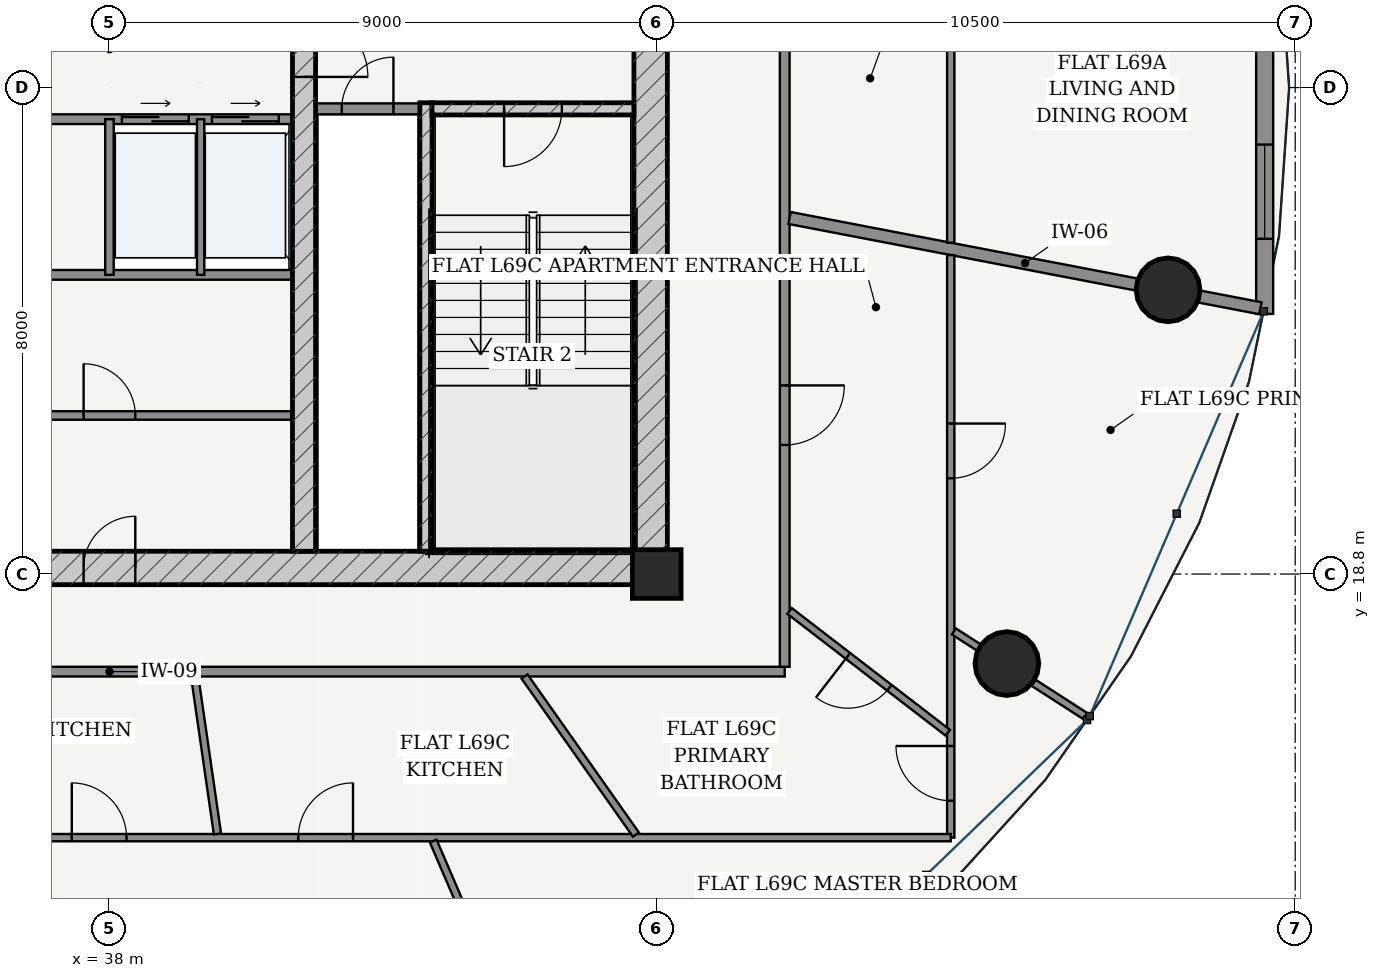
"""IFC4 building model, lengths in metres.
Left out: names, types, materials, properties, quantities, classifications, styles, units other than length and angle.
Written with IfcOpenShell. Run it as: python <this file> out.ifc"""

import sys

from ifc_helpers import new_model, si_unit, direction, frame, frame_2d, origin, origin_2d, place, context, subcontext, project, spatial, rectangle, hollow_circle, extrude, source, transform, mapped, element, fill, save


model = new_model("IFC4")
c1 = context("Model", 3, precision=1e-05, world=origin(), true_north=direction((-0.2419218956, 0.970295726276)))
c2 = subcontext(c1, "Body", "Model", "MODEL_VIEW")
j1 = project(units=[si_unit("LENGTHUNIT", "METRE"), si_unit("PLANEANGLEUNIT", "RADIAN")], contexts=[c1])
p1 = place(None, origin())
s1 = spatial("IfcSite", under=j1, at=p1, CompositionType="ELEMENT")
p2 = place(p1, origin())
s2 = spatial("IfcBuilding", under=s1, at=p2, CompositionType="ELEMENT")
p3 = place(p2, frame((0.0, 0.0, 263.2)))
s3 = spatial("IfcBuildingStorey", under=s2, at=p3, CompositionType="ELEMENT", Elevation=263.2)
p4 = place(p3, frame((47.0, 18.8, 0.0), z_axis=(0.0, 0.0, 1.0), x_axis=(1.0, 0.0, 0.0)))
e1 = element("IfcColumn", 1, at=p4, inside=s3, PredefinedType="COLUMN", context=c2, shape_type="SweptSolid", body=[
    extrude(rectangle(XDim=0.8, YDim=0.8, at=origin_2d()), origin(), (0.0, 0.0, 1.0), 3.75),
])
p5 = place(p3, frame((28.825, 18.9, 0.0), z_axis=(0.0, 0.0, 1.0), x_axis=(1.0, 0.0, 0.0)))
e2 = element("IfcWall", 2, at=p5, inside=s3, PredefinedType="SHEAR", context=c2, shape_type="SweptSolid", body=[
    extrude(rectangle(XDim=18.35, YDim=0.55, at=frame_2d((9.175, 0.0))), origin(), (0.0, 0.0, 1.0), 3.49),
])
p6 = place(p5, frame((8.75, 0.0, 0.0)))
e3 = element("IfcOpeningElement", 3, at=p6, cuts=e2, PredefinedType="OPENING", context=c2, shape_type="SweptSolid", body=[
    extrude(rectangle(XDim=0.85, YDim=2.1, at=frame_2d((0.425, 1.05))), frame((0.0, 0.285, 0.0), z_axis=(0.0, -1.0, 0.0), x_axis=(1.0, 0.0, 0.0)), (0.0, 0.0, 1.0), 0.57),
])
p7 = place(p3, frame((46.9, 19.175, 0.0), z_axis=(0.0, 0.0, 1.0), x_axis=(0.0, 1.0, 0.0)))
e4 = element("IfcWall", 4, at=p7, inside=s3, PredefinedType="SHEAR", context=c2, shape_type="SweptSolid", body=[
    extrude(rectangle(XDim=15.25, YDim=0.55, at=frame_2d((7.625, 0.0))), origin(), (0.0, 0.0, 1.0), 3.49),
])
p8 = place(p7, frame((9.875, 0.0, 0.0)))
e5 = element("IfcOpeningElement", 5, at=p8, cuts=e4, PredefinedType="OPENING", context=c2, shape_type="SweptSolid", body=[
    extrude(rectangle(XDim=1.5, YDim=2.2, at=frame_2d((0.75, 1.1))), frame((0.0, 0.285, 0.0), z_axis=(0.0, -1.0, 0.0), x_axis=(1.0, 0.0, 0.0)), (0.0, 0.0, 1.0), 0.57),
])
p9 = place(p3, frame((43.205, 19.175, 0.0), z_axis=(0.0, 0.0, 1.0), x_axis=(0.0, 1.0, 0.0)))
e6 = element("IfcWall", 6, at=p9, inside=s3, PredefinedType="SOLIDWALL", context=c2, shape_type="SweptSolid", body=[
    extrude(rectangle(XDim=7.375, YDim=0.2, at=frame_2d((3.688, 0.0))), origin(), (0.0, 0.0, 1.0), 3.49),
])
p10 = place(p3, frame((43.305, 26.45, 0.0), z_axis=(0.0, 0.0, 1.0), x_axis=(1.0, 0.0, 0.0)))
e7 = element("IfcWall", 7, at=p10, inside=s3, PredefinedType="SOLIDWALL", context=c2, shape_type="SweptSolid", body=[
    extrude(rectangle(XDim=3.32, YDim=0.2, at=frame_2d((1.66, 0.0))), origin(), (0.0, 0.0, 1.0), 3.49),
])
p11 = place(p10, frame((1.185, 0.0, 0.0)))
e8 = element("IfcOpeningElement", 8, at=p11, cuts=e7, PredefinedType="OPENING", context=c2, shape_type="SweptSolid", body=[
    extrude(rectangle(XDim=0.95, YDim=2.15, at=frame_2d((0.475, 1.075))), frame((0.0, 0.11, 0.0), z_axis=(0.0, -1.0, 0.0), x_axis=(1.0, 0.0, 0.0)), (0.0, 0.0, 1.0), 0.22),
])
p12 = place(p3, frame((41.2, 19.175, 0.0), z_axis=(0.0, 0.0, 1.0), x_axis=(0.0, 1.0, 0.0)))
e9 = element("IfcWall", 9, at=p12, inside=s3, PredefinedType="SHEAR", context=c2, shape_type="SweptSolid", body=[
    extrude(rectangle(XDim=15.25, YDim=0.38, at=frame_2d((7.625, 0.0))), origin(), (0.0, 0.0, 1.0), 3.49),
])
p13 = place(p12, frame((7.8, 0.0, 0.0)))
e10 = element("IfcOpeningElement", 10, at=p13, cuts=e9, PredefinedType="OPENING", context=c2, shape_type="SweptSolid", body=[
    extrude(rectangle(XDim=1.05, YDim=2.15, at=frame_2d((0.525, 1.075))), frame((0.0, 0.2, 0.0), z_axis=(0.0, -1.0, 0.0), x_axis=(1.0, 0.0, 0.0)), (0.0, 0.0, 1.0), 0.4),
])
for number, where, z_axis, x_axis in (
    (11, (52.759, 17.328, 0.0), (0.0, 0.0, 1.0), (1.0, 0.0, 0.0)),
    (12, (55.409, 23.474, 0.0), (0.0, 0.0, 1.0), (1.0, 0.0, 0.0)),
):
    element("IfcColumn", number, at=place(p3, frame(where, z_axis=z_axis, x_axis=x_axis)), inside=s3, PredefinedType="COLUMN", context=c2, shape_type="SweptSolid", body=[
        extrude(hollow_circle(Radius=0.525, WallThickness=0.035, at=origin_2d()), origin(), (0.0, 0.0, 1.0), 3.75),
    ])
p14 = place(p3, frame((56.998, 23.078, 0.0), z_axis=(0.0, 0.0, 1.0), x_axis=(0.0, 1.0, 0.0)))
e13 = element("IfcWall", 13, at=p14, inside=s3, PredefinedType="SOLIDWALL", context=c2, shape_type="SweptSolid", body=[
    extrude(rectangle(XDim=7.445, YDim=0.28, at=frame_2d((3.722, 0.0))), origin(), (0.0, 0.0, 1.0), 3.49),
])
p15 = place(p14, frame((1.235, 0.0, 0.85)))
e14 = element("IfcOpeningElement", 14, at=p15, cuts=e13, PredefinedType="OPENING", context=c2, shape_type="SweptSolid", body=[
    extrude(rectangle(XDim=1.55, YDim=1.95, at=frame_2d((0.775, 0.975))), frame((0.0, 0.15, 0.0), z_axis=(0.0, -1.0, 0.0), x_axis=(1.0, 0.0, 0.0)), (0.0, 0.0, 1.0), 0.3),
])
p16 = place(p14, frame((4.66, 0.0, 0.85)))
e15 = element("IfcOpeningElement", 15, at=p16, cuts=e13, PredefinedType="OPENING", context=c2, shape_type="SweptSolid", body=[
    extrude(rectangle(XDim=1.55, YDim=1.95, at=frame_2d((0.775, 0.975))), frame((0.0, 0.15, 0.0), z_axis=(0.0, -1.0, 0.0), x_axis=(1.0, 0.0, 0.0)), (0.0, 0.0, 1.0), 0.3),
])
p17 = place(p3, frame((41.39, 26.45, 0.0), z_axis=(0.0, 0.0, 1.0), x_axis=(1.0, 0.0, 0.0)))
e16 = element("IfcWall", 16, at=p17, inside=s3, PredefinedType="PARTITIONING", context=c2, shape_type="SweptSolid", body=[
    extrude(rectangle(XDim=1.71, YDim=0.18, at=frame_2d((0.855, 0.0))), origin(), (0.0, 0.0, 1.0), 3.49),
])
p18 = place(p17, frame((0.43, 0.0, 0.0)))
e17 = element("IfcOpeningElement", 17, at=p18, cuts=e16, PredefinedType="OPENING", context=c2, shape_type="SweptSolid", body=[
    extrude(rectangle(XDim=0.85, YDim=2.1, at=frame_2d((0.425, 1.05))), frame((0.0, 0.1, 0.0), z_axis=(0.0, -1.0, 0.0), x_axis=(1.0, 0.0, 0.0)), (0.0, 0.0, 1.0), 0.2),
])
p19 = place(p3, frame((34.99, 26.28, 0.0), z_axis=(0.0, 0.0, 1.0), x_axis=(1.0, 0.0, 0.0)))
e18 = element("IfcWall", 18, at=p19, inside=s3, PredefinedType="PARTITIONING", context=c2, shape_type="SweptSolid", body=[
    extrude(rectangle(XDim=6.02, YDim=0.16, at=frame_2d((3.01, 0.0))), origin(), (0.0, 0.0, 1.0), 3.49),
])
p20 = place(p19, frame((1.045, 0.0, 0.0)))
e19 = element("IfcOpeningElement", 19, at=p20, cuts=e18, PredefinedType="OPENING", context=c2, shape_type="SweptSolid", body=[
    extrude(rectangle(XDim=0.85, YDim=2.1, at=frame_2d((0.425, 1.05))), frame((0.0, 0.09, 0.0), z_axis=(0.0, -1.0, 0.0), x_axis=(1.0, 0.0, 0.0)), (0.0, 0.0, 1.0), 0.18),
])
p21 = place(p19, frame((3.215, 0.0, 0.0)))
e20 = element("IfcOpeningElement", 20, at=p21, cuts=e18, PredefinedType="OPENING", context=c2, shape_type="SweptSolid", body=[
    extrude(rectangle(XDim=1.1, YDim=2.2, at=frame_2d((0.55, 1.1))), frame((0.0, 0.09, 0.0), z_axis=(0.0, -1.0, 0.0), x_axis=(1.0, 0.0, 0.0)), (0.0, 0.0, 1.0), 0.18),
])
p22 = place(p19, frame((4.695, 0.0, 0.0)))
e21 = element("IfcOpeningElement", 21, at=p22, cuts=e18, PredefinedType="OPENING", context=c2, shape_type="SweptSolid", body=[
    extrude(rectangle(XDim=1.1, YDim=2.2, at=frame_2d((0.55, 1.1))), frame((0.0, 0.09, 0.0), z_axis=(0.0, -1.0, 0.0), x_axis=(1.0, 0.0, 0.0)), (0.0, 0.0, 1.0), 0.18),
])
p23 = place(p3, frame((34.99, 23.72, 0.0), z_axis=(0.0, 0.0, 1.0), x_axis=(1.0, 0.0, 0.0)))
e22 = element("IfcWall", 22, at=p23, inside=s3, PredefinedType="PARTITIONING", context=c2, shape_type="SweptSolid", body=[
    extrude(rectangle(XDim=6.02, YDim=0.16, at=frame_2d((3.01, 0.0))), origin(), (0.0, 0.0, 1.0), 3.49),
])
p24 = place(p3, frame((38.0, 23.72, 0.0), z_axis=(0.0, 0.0, 1.0), x_axis=(0.0, 1.0, 0.0)))
e23 = element("IfcWall", 23, at=p24, inside=s3, PredefinedType="PARTITIONING", context=c2, shape_type="SweptSolid", body=[
    extrude(rectangle(XDim=2.56, YDim=0.14, at=frame_2d((1.28, 0.0))), origin(), (0.0, 0.0, 1.0), 3.49),
])
p25 = place(p3, frame((39.5, 23.72, 0.0), z_axis=(0.0, 0.0, 1.0), x_axis=(0.0, 1.0, 0.0)))
e24 = element("IfcWall", 24, at=p25, inside=s3, PredefinedType="PARTITIONING", context=c2, shape_type="SweptSolid", body=[
    extrude(rectangle(XDim=2.56, YDim=0.12, at=frame_2d((1.28, 0.0))), origin(), (0.0, 0.0, 1.0), 3.49),
])
p26 = place(p3, frame((34.99, 21.407, 0.0), z_axis=(0.0, 0.0, 1.0), x_axis=(1.0, 0.0, 0.0)))
e25 = element("IfcWall", 25, at=p26, inside=s3, PredefinedType="PARTITIONING", context=c2, shape_type="SweptSolid", body=[
    extrude(rectangle(XDim=6.02, YDim=0.14, at=frame_2d((3.01, 0.0))), origin(), (0.0, 0.0, 1.0), 3.49),
])
p27 = place(p26, frame((2.585, 0.0, 0.0)))
e26 = element("IfcOpeningElement", 26, at=p27, cuts=e25, PredefinedType="OPENING", context=c2, shape_type="SweptSolid", body=[
    extrude(rectangle(XDim=0.85, YDim=2.1, at=frame_2d((0.425, 1.05))), frame((0.0, 0.08, 0.0), z_axis=(0.0, -1.0, 0.0), x_axis=(1.0, 0.0, 0.0)), (0.0, 0.0, 1.0), 0.16),
])
p28 = place(p3, frame((26.895, 17.195, 0.0), z_axis=(0.0, 0.0, 1.0), x_axis=(1.0, 0.0, 0.0)))
e27 = element("IfcWall", 27, at=p28, inside=s3, PredefinedType="PARTITIONING", context=c2, shape_type="SweptSolid", body=[
    extrude(rectangle(XDim=22.21, YDim=0.16, at=frame_2d((11.105, 0.0))), origin(), (0.0, 0.0, 1.0), 3.015),
])
p29 = place(p3, frame((49.105, 17.275, 0.0), z_axis=(0.0, 0.0, 1.0), x_axis=(0.0, 1.0, 0.0)))
e28 = element("IfcWall", 28, at=p29, inside=s3, PredefinedType="PARTITIONING", context=c2, shape_type="SweptSolid", body=[
    extrude(rectangle(XDim=13.925, YDim=0.16, at=frame_2d((6.962, 0.0))), origin(), (0.0, 0.0, 1.0), 3.015),
])
p30 = place(p29, frame((3.647, 0.0, 0.0)))
e29 = element("IfcOpeningElement", 29, at=p30, cuts=e28, PredefinedType="OPENING", context=c2, shape_type="SweptSolid", body=[
    extrude(rectangle(XDim=0.98, YDim=2.2, at=frame_2d((0.49, 1.1))), frame((0.0, 0.09, 0.0), z_axis=(0.0, -1.0, 0.0), x_axis=(1.0, 0.0, 0.0)), (0.0, 0.0, 1.0), 0.18),
])
p31 = place(p3, frame((49.185, 24.656, 0.0), z_axis=(0.0, 0.0, 1.0), x_axis=(0.982109889803, -0.188308694305, 0.0)))
e30 = element("IfcWall", 30, at=p31, inside=s3, PredefinedType="PARTITIONING", context=c2, shape_type="SweptSolid", body=[
    extrude(rectangle(XDim=7.884, YDim=0.2, at=frame_2d((3.942, 0.0))), origin(), (0.0, 0.0, 1.0), 3.015),
])
p32 = place(p3, frame((51.835, 34.01, 0.0), z_axis=(0.0, 0.0, 1.0), x_axis=(0.0, -1.0, 0.0)))
e31 = element("IfcWall", 31, at=p32, inside=s3, PredefinedType="PARTITIONING", context=c2, shape_type="SweptSolid", body=[
    extrude(rectangle(XDim=9.761, YDim=0.12, at=frame_2d((4.88, 0.0))), origin(), (0.0, 0.0, 1.0), 3.015),
])
p33 = place(p3, frame((51.835, 24.045, 0.0), z_axis=(0.0, 0.0, 1.0), x_axis=(0.0, -1.0, 0.0)))
e32 = element("IfcWall", 32, at=p33, inside=s3, PredefinedType="PARTITIONING", context=c2, shape_type="SweptSolid", body=[
    extrude(rectangle(XDim=9.58, YDim=0.12, at=frame_2d((4.79, 0.0))), origin(), (0.0, 0.0, 1.0), 3.015),
])
p34 = place(p33, frame((2.771, 0.0, 0.0)))
e33 = element("IfcOpeningElement", 33, at=p34, cuts=e32, PredefinedType="OPENING", context=c2, shape_type="SweptSolid", body=[
    extrude(rectangle(XDim=0.9, YDim=2.15, at=frame_2d((0.45, 1.075))), frame((0.0, 0.07, 0.0), z_axis=(0.0, -1.0, 0.0), x_axis=(1.0, 0.0, 0.0)), (0.0, 0.0, 1.0), 0.14),
])
p35 = place(p33, frame((8.073, 0.0, 0.0)))
e34 = element("IfcOpeningElement", 34, at=p35, cuts=e32, PredefinedType="OPENING", context=c2, shape_type="SweptSolid", body=[
    extrude(rectangle(XDim=0.9, YDim=2.15, at=frame_2d((0.45, 1.075))), frame((0.0, 0.07, 0.0), z_axis=(0.0, -1.0, 0.0), x_axis=(1.0, 0.0, 0.0)), (0.0, 0.0, 1.0), 0.14),
])
p36 = place(p3, frame((51.835, 14.465, 0.0), z_axis=(0.0, 0.0, 1.0), x_axis=(-1.0, 0.0, 0.0)))
e35 = element("IfcWall", 35, at=p36, inside=s3, PredefinedType="PARTITIONING", context=c2, shape_type="SweptSolid", body=[
    extrude(rectangle(XDim=16.278, YDim=0.12, at=frame_2d((8.139, 0.0))), origin(), (0.0, 0.0, 1.0), 3.015),
])
p37 = place(p36, frame((9.83, 0.0, 0.0)))
e36 = element("IfcOpeningElement", 36, at=p37, cuts=e35, PredefinedType="OPENING", context=c2, shape_type="SweptSolid", body=[
    extrude(rectangle(XDim=0.9, YDim=2.15, at=frame_2d((0.45, 1.075))), frame((0.0, 0.07, 0.0), z_axis=(0.0, -1.0, 0.0), x_axis=(1.0, 0.0, 0.0)), (0.0, 0.0, 1.0), 0.14),
])
p38 = place(p36, frame((13.554, 0.0, 0.0)))
e37 = element("IfcOpeningElement", 37, at=p38, cuts=e35, PredefinedType="OPENING", context=c2, shape_type="SweptSolid", body=[
    extrude(rectangle(XDim=0.9, YDim=2.15, at=frame_2d((0.45, 1.075))), frame((0.0, 0.07, 0.0), z_axis=(0.0, -1.0, 0.0), x_axis=(1.0, 0.0, 0.0)), (0.0, 0.0, 1.0), 0.14),
])
p39 = place(p3, frame((43.325, 14.408, 0.0), z_axis=(0.0, 0.0, 1.0), x_axis=(0.394816056217, -0.918760187292, 0.0)))
e38 = element("IfcWall", 38, at=p39, inside=s3, PredefinedType="PARTITIONING", context=c2, shape_type="SweptSolid", body=[
    extrude(rectangle(XDim=5.256, YDim=0.12, at=frame_2d((2.628, 0.0))), origin(), (0.0, 0.0, 1.0), 3.121),
])
p40 = place(p39, frame((2.178, 0.0, 0.0)))
e39 = element("IfcOpeningElement", 39, at=p40, cuts=e38, PredefinedType="OPENING", context=c2, shape_type="SweptSolid", body=[
    extrude(rectangle(XDim=0.9, YDim=2.15, at=frame_2d((0.45, 1.075))), frame((0.0, 0.07, 0.0), z_axis=(0.0, -1.0, 0.0), x_axis=(1.0, 0.0, 0.0)), (0.0, 0.0, 1.0), 0.14),
])
p41 = place(p3, frame((51.887, 17.856, 0.0), z_axis=(0.0, 0.0, 1.0), x_axis=(0.840708587197, -0.54148783127, 0.0)))
e40 = element("IfcWall", 40, at=p41, inside=s3, PredefinedType="PARTITIONING", context=c2, shape_type="SweptSolid", body=[
    extrude(rectangle(XDim=2.568, YDim=0.12, at=frame_2d((1.284, 0.0))), origin(), (0.0, 0.0, 1.0), 3.015),
])
p42 = place(p3, frame((39.402, 17.115, 0.0), z_axis=(0.0, 0.0, 1.0), x_axis=(0.143185278857, -0.989695900728, 0.0)))
e41 = element("IfcWall", 41, at=p42, inside=s3, PredefinedType="PARTITIONING", context=c2, shape_type="SweptSolid", body=[
    extrude(rectangle(XDim=2.615, YDim=0.12, at=frame_2d((1.308, 0.0))), origin(), (0.0, 0.0, 1.0), 3.49),
])
p43 = place(p3, frame((44.826, 17.115, 0.0), z_axis=(0.0, 0.0, 1.0), x_axis=(0.57609227969, -0.817384661761, 0.0)))
e42 = element("IfcWall", 42, at=p43, inside=s3, PredefinedType="PARTITIONING", context=c2, shape_type="SweptSolid", body=[
    extrude(rectangle(XDim=3.18, YDim=0.12, at=frame_2d((1.59, 0.0))), origin(), (0.0, 0.0, 1.0), 3.209),
])
p44 = place(p3, frame((49.185, 18.192, 0.0), z_axis=(0.0, 0.0, 1.0), x_axis=(0.792502290575, -0.609868936275, 0.0)))
e43 = element("IfcWall", 43, at=p44, inside=s3, PredefinedType="PARTITIONING", context=c2, shape_type="SweptSolid", body=[
    extrude(rectangle(XDim=3.282, YDim=0.12, at=frame_2d((1.641, 0.0))), origin(), (0.0, 0.0, 1.0), 3.121),
])
p45 = place(p44, frame((1.211, 0.0, 0.0)))
e44 = element("IfcOpeningElement", 44, at=p45, cuts=e43, PredefinedType="OPENING", context=c2, shape_type="SweptSolid", body=[
    extrude(rectangle(XDim=0.86, YDim=2.15, at=frame_2d((0.43, 1.075))), frame((0.0, 0.07, 0.0), z_axis=(0.0, -1.0, 0.0), x_axis=(1.0, 0.0, 0.0)), (0.0, 0.0, 1.0), 0.14),
])
m1 = source(origin(), c2, "Body", "SweptSolid", [
    extrude(rectangle(XDim=1.55, YDim=1.95, at=frame_2d((0.775, 0.975))), frame((0.0, 0.03, 0.0), z_axis=(0.0, -1.0, 0.0), x_axis=(1.0, 0.0, 0.0)), (0.0, 0.0, 1.0), 0.06),
])
p46 = place(p15, origin())
e45 = element("IfcWindow", 45, at=p46, inside=s3, PartitioningType="SINGLE_PANEL", PredefinedType="WINDOW", context=c2, shape_type="MappedRepresentation", body=[
    mapped(m1, transform((0.0, 0.0, 0.0), scale=1.0)),
])
fill(e14, e45)
m2 = source(origin(), c2, "Body", "SweptSolid", [
    extrude(rectangle(XDim=1.05, YDim=2.15, at=frame_2d((0.525, 1.075))), frame((0.0, 0.025, 0.0), z_axis=(0.0, -1.0, 0.0), x_axis=(1.0, 0.0, 0.0)), (0.0, 0.0, 1.0), 0.05),
])
p47 = place(p13, frame((1.05, 0.0, 0.0), z_axis=(0.0, 0.0, 1.0), x_axis=(-1.0, 0.0, 0.0)))
e46 = element("IfcDoor", 46, at=p47, inside=s3, OperationType="SINGLE_SWING_RIGHT", PredefinedType="DOOR", context=c2, shape_type="MappedRepresentation", body=[
    mapped(m2, transform((0.0, 0.0, 0.0), scale=1.0)),
])
fill(e10, e46)
m3 = source(origin(), c2, "Body", "SweptSolid", [
    extrude(rectangle(XDim=0.95, YDim=2.15, at=frame_2d((0.475, 1.075))), frame((0.0, 0.025, 0.0), z_axis=(0.0, -1.0, 0.0), x_axis=(1.0, 0.0, 0.0)), (0.0, 0.0, 1.0), 0.05),
])
p48 = place(p11, frame((0.95, 0.0, 0.0), z_axis=(0.0, 0.0, 1.0), x_axis=(-1.0, 0.0, 0.0)))
e47 = element("IfcDoor", 47, at=p48, inside=s3, OperationType="SINGLE_SWING_RIGHT", PredefinedType="DOOR", context=c2, shape_type="MappedRepresentation", body=[
    mapped(m3, transform((0.0, 0.0, 0.0), scale=1.0)),
])
fill(e8, e47)
m4 = source(origin(), c2, "Body", "SweptSolid", [
    extrude(rectangle(XDim=0.85, YDim=2.1, at=frame_2d((0.425, 1.05))), frame((0.0, 0.025, 0.0), z_axis=(0.0, -1.0, 0.0), x_axis=(1.0, 0.0, 0.0)), (0.0, 0.0, 1.0), 0.05),
])
p49 = place(p18, origin())
e48 = element("IfcDoor", 48, at=p49, inside=s3, OperationType="SINGLE_SWING_RIGHT", PredefinedType="DOOR", context=c2, shape_type="MappedRepresentation", body=[
    mapped(m4, transform((0.0, 0.0, 0.0), scale=1.0)),
])
fill(e17, e48)
p50 = place(p6, origin())
e49 = element("IfcDoor", 49, at=p50, inside=s3, OperationType="SINGLE_SWING_RIGHT", PredefinedType="DOOR", context=c2, shape_type="MappedRepresentation", body=[
    mapped(m4, transform((0.0, 0.0, 0.0), scale=1.0)),
])
fill(e3, e49)
p51 = place(p27, origin())
e50 = element("IfcDoor", 50, at=p51, inside=s3, OperationType="SINGLE_SWING_LEFT", PredefinedType="DOOR", context=c2, shape_type="MappedRepresentation", body=[
    mapped(m4, transform((0.0, 0.0, 0.0), scale=1.0)),
])
fill(e26, e50)
m5 = source(origin(), c2, "Body", "SweptSolid", [
    extrude(rectangle(XDim=1.1, YDim=2.2, at=frame_2d((0.55, 1.1))), frame((0.0, 0.025, 0.0), z_axis=(0.0, -1.0, 0.0), x_axis=(1.0, 0.0, 0.0)), (0.0, 0.0, 1.0), 0.05),
])
p52 = place(p21, origin())
e51 = element("IfcDoor", 51, at=p52, inside=s3, OperationType="DOUBLE_DOOR_SLIDING", PredefinedType="DOOR", context=c2, shape_type="MappedRepresentation", body=[
    mapped(m5, transform((0.0, 0.0, 0.0), scale=1.0)),
])
fill(e20, e51)
p53 = place(p22, origin())
e52 = element("IfcDoor", 52, at=p53, inside=s3, OperationType="DOUBLE_DOOR_SLIDING", PredefinedType="DOOR", context=c2, shape_type="MappedRepresentation", body=[
    mapped(m5, transform((0.0, 0.0, 0.0), scale=1.0)),
])
fill(e21, e52)
m6 = source(origin(), c2, "Body", "SweptSolid", [
    extrude(rectangle(XDim=0.98, YDim=2.2, at=frame_2d((0.49, 1.1))), frame((0.0, 0.025, 0.0), z_axis=(0.0, -1.0, 0.0), x_axis=(1.0, 0.0, 0.0)), (0.0, 0.0, 1.0), 0.05),
])
p54 = place(p30, frame((0.98, 0.0, 0.0), z_axis=(0.0, 0.0, 1.0), x_axis=(-1.0, 0.0, 0.0)))
e53 = element("IfcDoor", 53, at=p54, inside=s3, OperationType="SINGLE_SWING_LEFT", PredefinedType="DOOR", context=c2, shape_type="MappedRepresentation", body=[
    mapped(m6, transform((0.0, 0.0, 0.0), scale=1.0)),
])
fill(e29, e53)
m7 = source(origin(), c2, "Body", "SweptSolid", [
    extrude(rectangle(XDim=0.86, YDim=2.15, at=frame_2d((0.43, 1.075))), frame((0.0, 0.025, 0.0), z_axis=(0.0, -1.0, 0.0), x_axis=(1.0, 0.0, 0.0)), (0.0, 0.0, 1.0), 0.05),
])
p55 = place(p45, frame((0.86, 0.0, 0.0), z_axis=(0.0, 0.0, 1.0), x_axis=(-1.0, 0.0, 0.0)))
e54 = element("IfcDoor", 54, at=p55, inside=s3, OperationType="SINGLE_SWING_RIGHT", PredefinedType="DOOR", context=c2, shape_type="MappedRepresentation", body=[
    mapped(m7, transform((0.0, 0.0, 0.0), scale=1.0)),
])
fill(e44, e54)
m8 = source(origin(), c2, "Body", "SweptSolid", [
    extrude(rectangle(XDim=0.9, YDim=2.15, at=frame_2d((0.45, 1.075))), frame((0.0, 0.025, 0.0), z_axis=(0.0, -1.0, 0.0), x_axis=(1.0, 0.0, 0.0)), (0.0, 0.0, 1.0), 0.05),
])
p56 = place(p34, origin())
e55 = element("IfcDoor", 55, at=p56, inside=s3, OperationType="SINGLE_SWING_LEFT", PredefinedType="DOOR", context=c2, shape_type="MappedRepresentation", body=[
    mapped(m8, transform((0.0, 0.0, 0.0), scale=1.0)),
])
fill(e33, e55)
p57 = place(p35, frame((0.9, 0.0, 0.0), z_axis=(0.0, 0.0, 1.0), x_axis=(-1.0, 0.0, 0.0)))
e56 = element("IfcDoor", 56, at=p57, inside=s3, OperationType="SINGLE_SWING_RIGHT", PredefinedType="DOOR", context=c2, shape_type="MappedRepresentation", body=[
    mapped(m8, transform((0.0, 0.0, 0.0), scale=1.0)),
])
fill(e34, e56)
p58 = place(p37, frame((0.9, 0.0, 0.0), z_axis=(0.0, 0.0, 1.0), x_axis=(-1.0, 0.0, 0.0)))
e57 = element("IfcDoor", 57, at=p58, inside=s3, OperationType="SINGLE_SWING_RIGHT", PredefinedType="DOOR", context=c2, shape_type="MappedRepresentation", body=[
    mapped(m8, transform((0.0, 0.0, 0.0), scale=1.0)),
])
fill(e36, e57)
p59 = place(p38, frame((0.9, 0.0, 0.0), z_axis=(0.0, 0.0, 1.0), x_axis=(-1.0, 0.0, 0.0)))
e58 = element("IfcDoor", 58, at=p59, inside=s3, OperationType="SINGLE_SWING_LEFT", PredefinedType="DOOR", context=c2, shape_type="MappedRepresentation", body=[
    mapped(m8, transform((0.0, 0.0, 0.0), scale=1.0)),
])
fill(e37, e58)
save(model, sys.argv[1])
